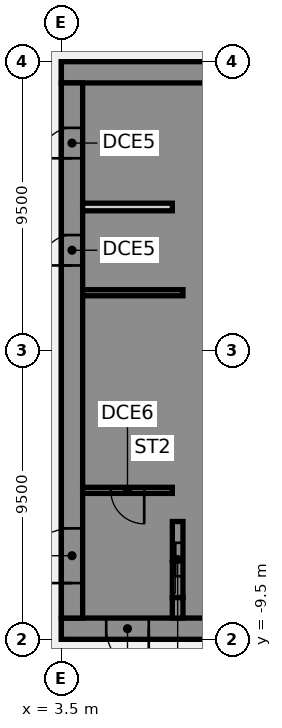
"""IFC4 building model, lengths in metres.
Left out: names, types, materials, properties, quantities, classifications, styles, units other than length and angle.
Written with IfcOpenShell. Run it as: python <this file> out.ifc"""

import sys

from ifc_helpers import new_model, si_unit, direction, frame, frame_2d, origin, place, context, subcontext, project, spatial, polyline, rectangle, outline, extrude, element, fill, save


model = new_model("IFC4")
c1 = context("Model", 3, precision=1e-05, world=origin(), true_north=direction((0.0, 1.0)))
c2 = subcontext(c1, "Body", "Model", "MODEL_VIEW")
j1 = project(units=[si_unit("LENGTHUNIT", "METRE"), si_unit("PLANEANGLEUNIT", "RADIAN")], contexts=[c1])
p1 = place(None, origin())
s1 = spatial("IfcSite", under=j1, at=p1, CompositionType="ELEMENT")
p2 = place(p1, origin())
s2 = spatial("IfcBuilding", under=s1, at=p2, CompositionType="ELEMENT")
p3 = place(p2, frame((0.0, 0.0, 79.0)))
s3 = spatial("IfcBuildingStorey", under=s2, at=p3, CompositionType="ELEMENT", Elevation=79.0)
p4 = place(p3, frame((16.5, -9.15, 0.0), z_axis=(0.0, 0.0, 1.0), x_axis=(-1.0, 0.0, 0.0)))
e1 = element("IfcWall", 1, at=p4, inside=s3, PredefinedType="SHEAR", context=c2, shape_type="SweptSolid", body=[
    extrude(rectangle(XDim=13.0, YDim=0.7, at=frame_2d((6.5, 0.0))), origin(), (0.0, 0.0, 1.0), 4.36),
])
p5 = place(p4, frame((4.15, 0.0, 0.0)))
e2 = element("IfcOpeningElement", 2, at=p5, cuts=e1, PredefinedType="OPENING", context=c2, shape_type="SweptSolid", body=[
    extrude(rectangle(XDim=1.4, YDim=2.1, at=frame_2d((0.7, 1.05))), frame((0.0, 0.36, 0.0), z_axis=(0.0, -1.0, 0.0), x_axis=(1.0, 0.0, 0.0)), (0.0, 0.0, 1.0), 0.72),
])
p6 = place(p4, frame((10.125, 0.0, 0.0)))
e3 = element("IfcOpeningElement", 3, at=p6, cuts=e1, PredefinedType="OPENING", context=c2, shape_type="SweptSolid", body=[
    extrude(rectangle(XDim=1.4, YDim=2.1, at=frame_2d((0.7, 1.05))), frame((0.0, 0.36, 0.0), z_axis=(0.0, -1.0, 0.0), x_axis=(1.0, 0.0, 0.0)), (0.0, 0.0, 1.0), 0.72),
])
p7 = place(p3, frame((16.5, 9.15, 0.0), z_axis=(0.0, 0.0, 1.0), x_axis=(-1.0, 0.0, 0.0)))
e4 = element("IfcWall", 4, at=p7, inside=s3, PredefinedType="SHEAR", context=c2, shape_type="SweptSolid", body=[
    extrude(rectangle(XDim=13.0, YDim=0.7, at=frame_2d((6.5, 0.0))), origin(), (0.0, 0.0, 1.0), 4.36),
])
p8 = place(p7, frame((4.15, 0.0, 0.0)))
e5 = element("IfcOpeningElement", 5, at=p8, cuts=e4, PredefinedType="OPENING", context=c2, shape_type="SweptSolid", body=[
    extrude(rectangle(XDim=1.4, YDim=2.1, at=frame_2d((0.7, 1.05))), frame((0.0, 0.36, 0.0), z_axis=(0.0, -1.0, 0.0), x_axis=(1.0, 0.0, 0.0)), (0.0, 0.0, 1.0), 0.72),
])
p9 = place(p3, origin())
e6 = element("IfcWall", 6, at=p9, inside=s3, PredefinedType="SHEAR", context=c2, shape_type="SweptSolid", body=[
    extrude(outline(polyline([(9.8, -5.375), (7.5, -5.375), (7.5, -2.875), (9.8, -2.875), (9.8, -2.625), (7.5, -2.625), (7.5, -0.125), (9.8, -0.125), (9.8, 0.125), (7.5, 0.125), (7.5, 2.625), (9.8, 2.625), (9.8, 2.875), (7.5, 2.875), (7.5, 5.375), (9.8, 5.375), (9.8, 5.625), (7.5, 5.625), (7.5, 8.125), (9.8, 8.125), (9.8, 8.8), (7.5, 8.8), (7.15, 8.8), (7.15, -5.625), (7.5, -5.625), (9.8, -5.625), (9.8, -5.375)])), origin(), (0.0, 0.0, 1.0), 4.36),
])
p10 = place(p3, origin())
e7 = element("IfcWall", 7, at=p10, inside=s3, PredefinedType="SHEAR", context=c2, shape_type="SweptSolid", body=[
    extrude(outline(polyline([(7.5, -8.125), (7.5, -8.8), (9.8, -8.8), (9.8, -8.125), (9.8, -5.625), (9.55, -5.625), (9.55, -8.125), (7.5, -8.125)])), origin(), (0.0, 0.0, 1.0), 4.36),
])
p11 = place(p3, frame((7.325, -8.8, 0.0), z_axis=(0.0, 0.0, 1.0), x_axis=(0.0, 1.0, 0.0)))
e8 = element("IfcWall", 8, at=p11, inside=s3, PredefinedType="SHEAR", context=c2, shape_type="SweptSolid", body=[
    extrude(rectangle(XDim=0.675, YDim=0.35, at=frame_2d((0.337, 0.0))), origin(), (0.0, 0.0, 1.0), 4.36),
])
p12 = place(p3, frame((7.5, 1.9, 0.0), z_axis=(0.0, 0.0, 1.0), x_axis=(-1.0, 0.0, 0.0)))
e9 = element("IfcWall", 9, at=p12, inside=s3, PredefinedType="SHEAR", context=c2, shape_type="SweptSolid", body=[
    extrude(rectangle(XDim=3.3, YDim=0.2, at=frame_2d((1.65, 0.0))), origin(), (0.0, 0.0, 1.0), 4.36),
])
p13 = place(p3, frame((7.325, -8.125, 0.0), z_axis=(0.0, 0.0, 1.0), x_axis=(0.0, 1.0, 0.0)))
e10 = element("IfcWall", 10, at=p13, inside=s3, PredefinedType="SHEAR", context=c2, shape_type="SweptSolid", body=[
    extrude(rectangle(XDim=2.5, YDim=0.35, at=frame_2d((1.25, 0.0))), origin(), (0.0, 0.0, 1.0), 4.36),
])
p14 = place(p13, frame((0.7, 0.0, 0.0)))
e11 = element("IfcOpeningElement", 11, at=p14, cuts=e10, PredefinedType="OPENING", context=c2, shape_type="SweptSolid", body=[
    extrude(rectangle(XDim=1.1, YDim=2.1, at=frame_2d((0.55, 1.05))), frame((0.0, 0.185, 0.0), z_axis=(0.0, -1.0, 0.0), x_axis=(1.0, 0.0, 0.0)), (0.0, 0.0, 1.0), 0.37),
])
p15 = place(p3, frame((3.85, -8.8, 0.0), z_axis=(0.0, 0.0, 1.0), x_axis=(0.0, 1.0, 0.0)))
e12 = element("IfcWall", 12, at=p15, inside=s3, PredefinedType="SHEAR", context=c2, shape_type="SweptSolid", body=[
    extrude(rectangle(XDim=17.6, YDim=0.7, at=frame_2d((8.8, 0.0))), origin(), (0.0, 0.0, 1.0), 4.36),
])
p16 = place(p15, frame((1.15, 0.0, 0.0)))
e13 = element("IfcOpeningElement", 13, at=p16, cuts=e12, PredefinedType="OPENING", context=c2, shape_type="SweptSolid", body=[
    extrude(rectangle(XDim=1.8, YDim=2.1, at=frame_2d((0.9, 1.05))), frame((0.0, 0.36, 0.0), z_axis=(0.0, -1.0, 0.0), x_axis=(1.0, 0.0, 0.0)), (0.0, 0.0, 1.0), 0.72),
])
p17 = place(p15, frame((11.597, 0.0, 0.0)))
e14 = element("IfcOpeningElement", 14, at=p17, cuts=e12, PredefinedType="OPENING", context=c2, shape_type="SweptSolid", body=[
    extrude(rectangle(XDim=1.0, YDim=2.1, at=frame_2d((0.5, 1.05))), frame((0.0, 0.36, 0.0), z_axis=(0.0, -1.0, 0.0), x_axis=(1.0, 0.0, 0.0)), (0.0, 0.0, 1.0), 0.72),
])
p18 = place(p15, frame((15.123, 0.0, 0.0)))
e15 = element("IfcOpeningElement", 15, at=p18, cuts=e12, PredefinedType="OPENING", context=c2, shape_type="SweptSolid", body=[
    extrude(rectangle(XDim=1.0, YDim=2.1, at=frame_2d((0.5, 1.05))), frame((0.0, 0.36, 0.0), z_axis=(0.0, -1.0, 0.0), x_axis=(1.0, 0.0, 0.0)), (0.0, 0.0, 1.0), 0.72),
])
p19 = place(p3, frame((7.15, 4.72, 0.0), z_axis=(0.0, 0.0, 1.0), x_axis=(-1.0, 0.0, 0.0)))
e16 = element("IfcWall", 16, at=p19, inside=s3, PredefinedType="PARTITIONING", context=c2, shape_type="SweptSolid", body=[
    extrude(rectangle(XDim=2.95, YDim=0.25, at=frame_2d((1.475, 0.0))), origin(), (0.0, 0.0, 1.0), 4.36),
])
p20 = place(p3, frame((7.15, -4.6, 0.0), z_axis=(0.0, 0.0, 1.0), x_axis=(-1.0, 0.0, 0.0)))
e17 = element("IfcWall", 17, at=p20, inside=s3, PredefinedType="SHEAR", context=c2, shape_type="SweptSolid", body=[
    extrude(rectangle(XDim=2.95, YDim=0.2, at=frame_2d((1.475, 0.0))), origin(), (0.0, 0.0, 1.0), 4.36),
])
p21 = place(p20, frame((0.925, 0.0, 0.0)))
e18 = element("IfcOpeningElement", 18, at=p21, cuts=e17, PredefinedType="OPENING", context=c2, shape_type="SweptSolid", body=[
    extrude(rectangle(XDim=1.1, YDim=2.1, at=frame_2d((0.55, 1.05))), frame((0.0, 0.11, 0.0), z_axis=(0.0, -1.0, 0.0), x_axis=(1.0, 0.0, 0.0)), (0.0, 0.0, 1.0), 0.22),
])
p22 = place(p6, origin())
e19 = element("IfcDoor", 19, at=p22, inside=s3, OperationType="SINGLE_SWING_LEFT", PredefinedType="DOOR", context=c2, shape_type="SweptSolid", body=[
    extrude(rectangle(XDim=1.4, YDim=2.1, at=frame_2d((0.7, 1.05))), frame((0.0, 0.025, 0.0), z_axis=(0.0, -1.0, 0.0), x_axis=(1.0, 0.0, 0.0)), (0.0, 0.0, 1.0), 0.05),
])
fill(e3, e19)
p23 = place(p16, origin())
e20 = element("IfcDoor", 20, at=p23, inside=s3, OperationType="SINGLE_SWING_LEFT", PredefinedType="DOOR", context=c2, shape_type="SweptSolid", body=[
    extrude(rectangle(XDim=1.8, YDim=2.1, at=frame_2d((0.9, 1.05))), frame((0.0, 0.025, 0.0), z_axis=(0.0, -1.0, 0.0), x_axis=(1.0, 0.0, 0.0)), (0.0, 0.0, 1.0), 0.05),
])
fill(e13, e20)
p24 = place(p17, origin())
e21 = element("IfcDoor", 21, at=p24, inside=s3, OperationType="SINGLE_SWING_LEFT", PredefinedType="DOOR", context=c2, shape_type="SweptSolid", body=[
    extrude(rectangle(XDim=1.0, YDim=2.1, at=frame_2d((0.5, 1.05))), frame((0.0, -0.275, 0.0), z_axis=(0.0, -1.0, 0.0), x_axis=(1.0, 0.0, 0.0)), (0.0, 0.0, 1.0), 0.05),
])
fill(e14, e21)
p25 = place(p18, origin())
e22 = element("IfcDoor", 22, at=p25, inside=s3, OperationType="SINGLE_SWING_LEFT", PredefinedType="DOOR", context=c2, shape_type="SweptSolid", body=[
    extrude(rectangle(XDim=1.0, YDim=2.1, at=frame_2d((0.5, 1.05))), frame((0.0, -0.275, 0.0), z_axis=(0.0, -1.0, 0.0), x_axis=(1.0, 0.0, 0.0)), (0.0, 0.0, 1.0), 0.05),
])
fill(e15, e22)
p26 = place(p21, origin())
e23 = element("IfcDoor", 23, at=p26, inside=s3, OperationType="SINGLE_SWING_LEFT", PredefinedType="DOOR", context=c2, shape_type="SweptSolid", body=[
    extrude(rectangle(XDim=1.1, YDim=2.1, at=frame_2d((0.55, 1.05))), frame((0.0, 0.025, 0.0), z_axis=(0.0, -1.0, 0.0), x_axis=(1.0, 0.0, 0.0)), (0.0, 0.0, 1.0), 0.05),
])
fill(e18, e23)
p27 = place(p14, origin())
e24 = element("IfcDoor", 24, at=p27, inside=s3, OperationType="SLIDING_TO_LEFT", PredefinedType="DOOR", context=c2, shape_type="SweptSolid", body=[
    extrude(rectangle(XDim=1.1, YDim=2.1, at=frame_2d((0.55, 1.05))), frame((0.0, 0.025, 0.0), z_axis=(0.0, -1.0, 0.0), x_axis=(1.0, 0.0, 0.0)), (0.0, 0.0, 1.0), 0.05),
])
fill(e11, e24)
save(model, sys.argv[1])
